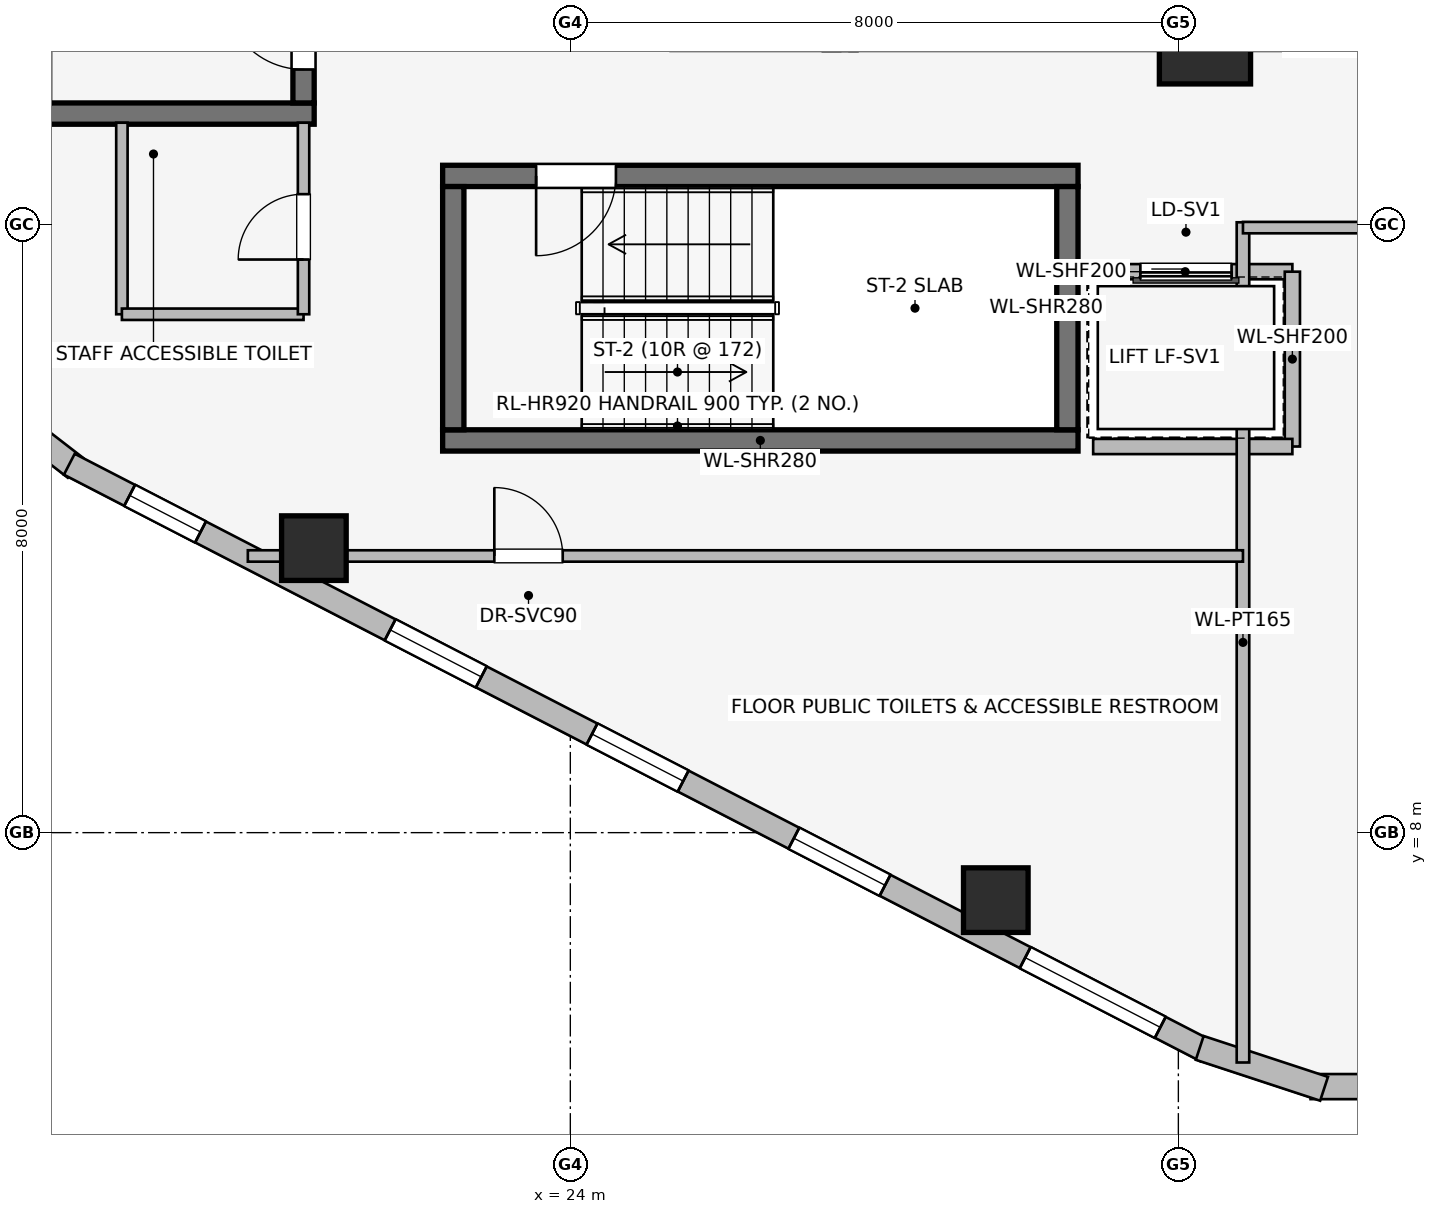
"""IFC4 building model, lengths in metres.
Left out: names, types, materials, properties, quantities, classifications, styles, units other than length and angle.
Written with IfcOpenShell. Run it as: python <this file> out.ifc"""

import sys

from ifc_helpers import new_model, si_unit, direction, frame, frame_2d, origin, origin_2d, place, context, subcontext, project, spatial, rectangle, extrude, element, fill, save


model = new_model("IFC4")
c1 = context("Model", 3, precision=1e-05, world=origin(), true_north=direction((0.0, 1.0)))
c2 = subcontext(c1, "Body", "Model", "MODEL_VIEW")
j1 = project(units=[si_unit("LENGTHUNIT", "METRE"), si_unit("PLANEANGLEUNIT", "RADIAN")], contexts=[c1])
p1 = place(None, origin())
s1 = spatial("IfcSite", under=j1, at=p1, CompositionType="ELEMENT")
p2 = place(p1, origin())
s2 = spatial("IfcBuilding", under=s1, at=p2, CompositionType="ELEMENT")
p3 = place(p2, frame((0.0, 0.0, 217.15)))
s3 = spatial("IfcBuildingStorey", under=s2, at=p3, CompositionType="ELEMENT", Elevation=217.15)
p4 = place(p3, frame((16.87, 17.46, 0.0), z_axis=(0.0, 0.0, 1.0), x_axis=(1.0, 0.0, 0.0)))
e1 = element("IfcWall", 1, at=p4, inside=s3, PredefinedType="SHEAR", context=c2, shape_type="SweptSolid", body=[
    extrude(rectangle(XDim=3.76, YDim=0.28, at=frame_2d((1.88, 0.0))), origin(), (0.0, 0.0, 1.0), 3.45),
])
p5 = place(p3, frame((20.49, 17.6, 0.0), z_axis=(0.0, 0.0, 1.0), x_axis=(0.0, 1.0, 0.0)))
e2 = element("IfcWall", 2, at=p5, inside=s3, PredefinedType="SHEAR", context=c2, shape_type="SweptSolid", body=[
    extrude(rectangle(XDim=7.8, YDim=0.28, at=frame_2d((3.9, 0.0))), origin(), (0.0, 0.0, 1.0), 3.45),
])
p6 = place(p5, frame((0.44, 0.0, 0.0)))
e3 = element("IfcOpeningElement", 3, at=p6, cuts=e2, PredefinedType="OPENING", context=c2, shape_type="SweptSolid", body=[
    extrude(rectangle(XDim=1.05, YDim=2.0, at=frame_2d((0.525, 1.0))), frame((0.0, 0.15, 0.0), z_axis=(0.0, -1.0, 0.0), x_axis=(1.0, 0.0, 0.0)), (0.0, 0.0, 1.0), 0.3),
])
p7 = place(p3, frame((22.32, 13.16, 0.0), z_axis=(0.0, 0.0, 1.0), x_axis=(1.0, 0.0, 0.0)))
e4 = element("IfcWall", 4, at=p7, inside=s3, PredefinedType="SHEAR", context=c2, shape_type="SweptSolid", body=[
    extrude(rectangle(XDim=8.36, YDim=0.28, at=frame_2d((4.18, 0.0))), origin(), (0.0, 0.0, 1.0), 3.45),
])
p8 = place(p3, frame((30.68, 16.64, 0.0), z_axis=(0.0, 0.0, 1.0), x_axis=(-1.0, 0.0, 0.0)))
e5 = element("IfcWall", 5, at=p8, inside=s3, PredefinedType="SHEAR", context=c2, shape_type="SweptSolid", body=[
    extrude(rectangle(XDim=8.36, YDim=0.28, at=frame_2d((4.18, 0.0))), origin(), (0.0, 0.0, 1.0), 3.45),
])
p9 = place(p8, frame((6.08, 0.0, 0.0)))
e6 = element("IfcOpeningElement", 6, at=p9, cuts=e5, PredefinedType="OPENING", context=c2, shape_type="SweptSolid", body=[
    extrude(rectangle(XDim=1.05, YDim=2.0, at=frame_2d((0.525, 1.0))), frame((0.0, 0.15, 0.0), z_axis=(0.0, -1.0, 0.0), x_axis=(1.0, 0.0, 0.0)), (0.0, 0.0, 1.0), 0.3),
])
for number, where, z_axis, x_axis in (
    (7, (22.46, 16.5, 0.0), (0.0, 0.0, 1.0), (0.0, -1.0, 0.0)),
    (8, (30.54, 13.3, 0.0), (0.0, 0.0, 1.0), (0.0, 1.0, 0.0)),
):
    element("IfcWall", number, at=place(p3, frame(where, z_axis=z_axis, x_axis=x_axis)), inside=s3, PredefinedType="SHEAR", context=c2, shape_type="SweptSolid", body=[
        extrude(rectangle(XDim=3.2, YDim=0.28, at=frame_2d((1.6, 0.0))), origin(), (0.0, 0.0, 1.0), 3.45),
    ])
p10 = place(p3, frame((32.35, 18.45, 0.0), z_axis=(0.0, 0.0, 1.0), x_axis=(1.0, 0.0, 0.0)))
e9 = element("IfcColumn", 9, at=p10, inside=s3, PredefinedType="COLUMN", context=c2, shape_type="SweptSolid", body=[
    extrude(rectangle(XDim=1.2, YDim=1.2, at=origin_2d()), origin(), (0.0, 0.0, 1.0), 3.45),
])
for number, where, z_axis, x_axis in (
    (10, (20.626, 11.743, 0.0), (0.0, 0.0, 1.0), (1.0, 0.0, 0.0)),
    (11, (29.598, 7.112, 0.0), (0.0, 0.0, 1.0), (1.0, 0.0, 0.0)),
):
    element("IfcColumn", number, at=place(p3, frame(where, z_axis=z_axis, x_axis=x_axis)), inside=s3, PredefinedType="COLUMN", context=c2, shape_type="SweptSolid", body=[
        extrude(rectangle(XDim=0.85, YDim=0.85, at=origin_2d()), origin(), (0.0, 0.0, 1.0), 3.45),
    ])
p11 = place(p3, frame((17.489, 12.8, 0.0), z_axis=(0.0, 0.0, 1.0), x_axis=(-0.791409877269, 0.611285862884, 0.0)))
e12 = element("IfcWall", 12, at=p11, inside=s3, PredefinedType="STANDARD", context=c2, shape_type="SweptSolid", body=[
    extrude(rectangle(XDim=1.677, YDim=0.33, at=frame_2d((0.838, 0.0))), origin(), (0.0, 0.0, 1.0), 3.03),
])
p12 = place(p3, frame((32.362, 5.129, 0.0), z_axis=(0.0, 0.0, 1.0), x_axis=(-0.888626188278, 0.458632202867, 0.0)))
e13 = element("IfcWall", 13, at=p12, inside=s3, PredefinedType="STANDARD", context=c2, shape_type="SweptSolid", body=[
    extrude(rectangle(XDim=16.828, YDim=0.31, at=frame_2d((8.414, 0.0))), origin(), (0.0, 0.0, 1.0), 3.03),
])
p13 = place(p12, frame((0.675, 0.0, 0.75)))
e14 = element("IfcOpeningElement", 14, at=p13, cuts=e13, PredefinedType="OPENING", context=c2, shape_type="SweptSolid", body=[
    extrude(rectangle(XDim=2.0, YDim=1.5, at=frame_2d((1.0, 0.75))), frame((0.0, 0.165, 0.0), z_axis=(0.0, -1.0, 0.0), x_axis=(1.0, 0.0, 0.0)), (0.0, 0.0, 1.0), 0.33),
])
p14 = place(p12, frame((4.75, 0.0, 0.75)))
e15 = element("IfcOpeningElement", 15, at=p14, cuts=e13, PredefinedType="OPENING", context=c2, shape_type="SweptSolid", body=[
    extrude(rectangle(XDim=1.35, YDim=1.45, at=frame_2d((0.675, 0.725))), frame((0.0, 0.165, 0.0), z_axis=(0.0, -1.0, 0.0), x_axis=(1.0, 0.0, 0.0)), (0.0, 0.0, 1.0), 0.33),
])
p15 = place(p12, frame((7.739, 0.0, 0.75)))
e16 = element("IfcOpeningElement", 16, at=p15, cuts=e13, PredefinedType="OPENING", context=c2, shape_type="SweptSolid", body=[
    extrude(rectangle(XDim=1.35, YDim=1.45, at=frame_2d((0.675, 0.725))), frame((0.0, 0.165, 0.0), z_axis=(0.0, -1.0, 0.0), x_axis=(1.0, 0.0, 0.0)), (0.0, 0.0, 1.0), 0.33),
])
p16 = place(p12, frame((10.728, 0.0, 0.75)))
e17 = element("IfcOpeningElement", 17, at=p16, cuts=e13, PredefinedType="OPENING", context=c2, shape_type="SweptSolid", body=[
    extrude(rectangle(XDim=1.35, YDim=1.45, at=frame_2d((0.675, 0.725))), frame((0.0, 0.165, 0.0), z_axis=(0.0, -1.0, 0.0), x_axis=(1.0, 0.0, 0.0)), (0.0, 0.0, 1.0), 0.33),
])
p17 = place(p12, frame((14.885, 0.0, 0.75)))
e18 = element("IfcOpeningElement", 18, at=p17, cuts=e13, PredefinedType="OPENING", context=c2, shape_type="SweptSolid", body=[
    extrude(rectangle(XDim=1.05, YDim=1.4, at=frame_2d((0.525, 0.7))), frame((0.0, 0.165, 0.0), z_axis=(0.0, -1.0, 0.0), x_axis=(1.0, 0.0, 0.0)), (0.0, 0.0, 1.0), 0.33),
])
p18 = place(p3, frame((35.461, 4.659, 0.0), z_axis=(0.0, 0.0, 1.0), x_axis=(-1.0, 0.0, 0.0)))
e19 = element("IfcWall", 19, at=p18, inside=s3, PredefinedType="STANDARD", context=c2, shape_type="SweptSolid", body=[
    extrude(rectangle(XDim=1.722, YDim=0.33, at=frame_2d((0.861, 0.0))), origin(), (0.0, 0.0, 1.0), 3.03),
])
p19 = place(p3, frame((33.917, 4.63, 0.0), z_axis=(0.0, 0.0, 1.0), x_axis=(-0.949937416267, 0.312440242569, 0.0)))
e20 = element("IfcWall", 20, at=p19, inside=s3, PredefinedType="STANDARD", context=c2, shape_type="SweptSolid", body=[
    extrude(rectangle(XDim=1.722, YDim=0.33, at=frame_2d((0.861, 0.0))), origin(), (0.0, 0.0, 1.0), 3.03),
])
p20 = place(p3, frame((33.5, 15.38, 0.0), z_axis=(0.0, 0.0, 1.0), x_axis=(-1.0, 0.0, 0.0)))
e21 = element("IfcWall", 21, at=p20, inside=s3, PredefinedType="PARTITIONING", context=c2, shape_type="SweptSolid", body=[
    extrude(rectangle(XDim=2.82, YDim=0.2, at=frame_2d((1.41, 0.0))), origin(), (0.0, 0.0, 1.0), 3.03),
])
p21 = place(p20, frame((0.8, 0.0, 0.0)))
e22 = element("IfcOpeningElement", 22, at=p21, cuts=e21, PredefinedType="OPENING", context=c2, shape_type="SweptSolid", body=[
    extrude(rectangle(XDim=1.2, YDim=2.2, at=frame_2d((0.6, 1.1))), frame((0.0, 0.11, 0.0), z_axis=(0.0, -1.0, 0.0), x_axis=(1.0, 0.0, 0.0)), (0.0, 0.0, 1.0), 0.22),
])
p22 = place(p3, frame((33.5, 13.08, 0.0), z_axis=(0.0, 0.0, 1.0), x_axis=(0.0, 1.0, 0.0)))
e23 = element("IfcWall", 23, at=p22, inside=s3, PredefinedType="PARTITIONING", context=c2, shape_type="SweptSolid", body=[
    extrude(rectangle(XDim=2.3, YDim=0.2, at=frame_2d((1.15, 0.0))), origin(), (0.0, 0.0, 1.0), 3.03),
])
p23 = place(p3, frame((30.879, 13.08, 0.0), z_axis=(0.0, 0.0, 1.0), x_axis=(1.0, 0.0, 0.0)))
e24 = element("IfcWall", 24, at=p23, inside=s3, PredefinedType="PARTITIONING", context=c2, shape_type="SweptSolid", body=[
    extrude(rectangle(XDim=2.621, YDim=0.2, at=frame_2d((1.311, 0.0))), origin(), (0.0, 0.0, 1.0), 3.03),
])
p24 = place(p3, frame((18.1, 17.34, 0.0), z_axis=(0.0, 0.0, 1.0), x_axis=(0.0, -1.0, 0.0)))
e25 = element("IfcWall", 25, at=p24, inside=s3, PredefinedType="PARTITIONING", context=c2, shape_type="SweptSolid", body=[
    extrude(rectangle(XDim=2.52, YDim=0.15, at=frame_2d((1.26, 0.0))), origin(), (0.0, 0.0, 1.0), 3.03),
])
p25 = place(p3, frame((18.1, 14.82, 0.0), z_axis=(0.0, 0.0, 1.0), x_axis=(1.0, 0.0, 0.0)))
e26 = element("IfcWall", 26, at=p25, inside=s3, PredefinedType="PARTITIONING", context=c2, shape_type="SweptSolid", body=[
    extrude(rectangle(XDim=2.39, YDim=0.15, at=frame_2d((1.195, 0.0))), origin(), (0.0, 0.0, 1.0), 3.03),
])
p26 = place(p3, frame((20.49, 14.82, 0.0), z_axis=(0.0, 0.0, 1.0), x_axis=(0.0, 1.0, 0.0)))
e27 = element("IfcWall", 27, at=p26, inside=s3, PredefinedType="PARTITIONING", context=c2, shape_type="SweptSolid", body=[
    extrude(rectangle(XDim=2.52, YDim=0.15, at=frame_2d((1.26, 0.0))), origin(), (0.0, 0.0, 1.0), 3.03),
])
p27 = place(p26, frame((0.72, 0.0, 0.0)))
e28 = element("IfcOpeningElement", 28, at=p27, cuts=e27, PredefinedType="OPENING", context=c2, shape_type="SweptSolid", body=[
    extrude(rectangle(XDim=0.86, YDim=2.0, at=frame_2d((0.43, 1.0))), frame((0.0, 0.085, 0.0), z_axis=(0.0, -1.0, 0.0), x_axis=(1.0, 0.0, 0.0)), (0.0, 0.0, 1.0), 0.17),
])
p28 = place(p3, frame((32.85, 4.976, 0.0), z_axis=(0.0, 0.0, 1.0), x_axis=(0.0, 1.0, 0.0)))
e29 = element("IfcWall", 29, at=p28, inside=s3, PredefinedType="PARTITIONING", context=c2, shape_type="SweptSolid", body=[
    extrude(rectangle(XDim=11.054, YDim=0.165, at=frame_2d((5.527, 0.0))), origin(), (0.0, 0.0, 1.0), 3.03),
])
p29 = place(p3, frame((19.757, 11.64, 0.0), z_axis=(0.0, 0.0, 1.0), x_axis=(1.0, 0.0, 0.0)))
e30 = element("IfcWall", 30, at=p29, inside=s3, PredefinedType="PARTITIONING", context=c2, shape_type="SweptSolid", body=[
    extrude(rectangle(XDim=13.093, YDim=0.15, at=frame_2d((6.546, 0.0))), origin(), (0.0, 0.0, 1.0), 3.03),
])
p30 = place(p29, frame((3.243, 0.0, 0.0)))
e31 = element("IfcOpeningElement", 31, at=p30, cuts=e30, PredefinedType="OPENING", context=c2, shape_type="SweptSolid", body=[
    extrude(rectangle(XDim=0.9, YDim=2.0, at=frame_2d((0.45, 1.0))), frame((0.0, 0.085, 0.0), z_axis=(0.0, -1.0, 0.0), x_axis=(1.0, 0.0, 0.0)), (0.0, 0.0, 1.0), 0.17),
])
p31 = place(p3, frame((32.85, 15.96, 0.0), z_axis=(0.0, 0.0, 1.0), x_axis=(1.0, 0.0, 0.0)))
e32 = element("IfcWall", 32, at=p31, inside=s3, PredefinedType="PARTITIONING", context=c2, shape_type="SweptSolid", body=[
    extrude(rectangle(XDim=7.03, YDim=0.15, at=frame_2d((3.515, 0.0))), origin(), (0.0, 0.0, 1.0), 3.03),
])
p32 = place(p31, frame((2.785, 0.0, 0.0)))
e33 = element("IfcOpeningElement", 33, at=p32, cuts=e32, PredefinedType="OPENING", context=c2, shape_type="SweptSolid", body=[
    extrude(rectangle(XDim=0.96, YDim=2.0, at=frame_2d((0.48, 1.0))), frame((0.0, 0.085, 0.0), z_axis=(0.0, -1.0, 0.0), x_axis=(1.0, 0.0, 0.0)), (0.0, 0.0, 1.0), 0.17),
])
p33 = place(p13, origin())
e34 = element("IfcWindow", 34, at=p33, inside=s3, PartitioningType="SINGLE_PANEL", PredefinedType="WINDOW", context=c2, shape_type="SweptSolid", body=[
    extrude(rectangle(XDim=2.0, YDim=1.5, at=frame_2d((1.0, 0.75))), frame((0.0, 0.03, 0.0), z_axis=(0.0, -1.0, 0.0), x_axis=(1.0, 0.0, 0.0)), (0.0, 0.0, 1.0), 0.06),
])
fill(e14, e34)
p34 = place(p14, origin())
e35 = element("IfcWindow", 35, at=p34, inside=s3, PartitioningType="SINGLE_PANEL", PredefinedType="WINDOW", context=c2, shape_type="SweptSolid", body=[
    extrude(rectangle(XDim=1.35, YDim=1.45, at=frame_2d((0.675, 0.725))), frame((0.0, 0.03, 0.0), z_axis=(0.0, -1.0, 0.0), x_axis=(1.0, 0.0, 0.0)), (0.0, 0.0, 1.0), 0.06),
])
fill(e15, e35)
p35 = place(p15, origin())
e36 = element("IfcWindow", 36, at=p35, inside=s3, PartitioningType="SINGLE_PANEL", PredefinedType="WINDOW", context=c2, shape_type="SweptSolid", body=[
    extrude(rectangle(XDim=1.35, YDim=1.45, at=frame_2d((0.675, 0.725))), frame((0.0, 0.03, 0.0), z_axis=(0.0, -1.0, 0.0), x_axis=(1.0, 0.0, 0.0)), (0.0, 0.0, 1.0), 0.06),
])
fill(e16, e36)
p36 = place(p16, origin())
e37 = element("IfcWindow", 37, at=p36, inside=s3, PartitioningType="SINGLE_PANEL", PredefinedType="WINDOW", context=c2, shape_type="SweptSolid", body=[
    extrude(rectangle(XDim=1.35, YDim=1.45, at=frame_2d((0.675, 0.725))), frame((0.0, 0.03, 0.0), z_axis=(0.0, -1.0, 0.0), x_axis=(1.0, 0.0, 0.0)), (0.0, 0.0, 1.0), 0.06),
])
fill(e17, e37)
p37 = place(p17, origin())
e38 = element("IfcWindow", 38, at=p37, inside=s3, PartitioningType="SINGLE_PANEL", PredefinedType="WINDOW", context=c2, shape_type="SweptSolid", body=[
    extrude(rectangle(XDim=1.05, YDim=1.4, at=frame_2d((0.525, 0.7))), frame((0.0, 0.03, 0.0), z_axis=(0.0, -1.0, 0.0), x_axis=(1.0, 0.0, 0.0)), (0.0, 0.0, 1.0), 0.06),
])
fill(e18, e38)
p38 = place(p6, origin())
e39 = element("IfcDoor", 39, at=p38, inside=s3, OperationType="SINGLE_SWING_RIGHT", PredefinedType="DOOR", context=c2, shape_type="SweptSolid", body=[
    extrude(rectangle(XDim=1.05, YDim=2.0, at=frame_2d((0.525, 1.0))), frame((0.0, 0.025, 0.0), z_axis=(0.0, -1.0, 0.0), x_axis=(1.0, 0.0, 0.0)), (0.0, 0.0, 1.0), 0.05),
])
fill(e3, e39)
p39 = place(p9, origin())
e40 = element("IfcDoor", 40, at=p39, inside=s3, OperationType="SINGLE_SWING_RIGHT", PredefinedType="DOOR", context=c2, shape_type="SweptSolid", body=[
    extrude(rectangle(XDim=1.05, YDim=2.0, at=frame_2d((0.525, 1.0))), frame((0.0, 0.025, 0.0), z_axis=(0.0, -1.0, 0.0), x_axis=(1.0, 0.0, 0.0)), (0.0, 0.0, 1.0), 0.05),
])
fill(e6, e40)
p40 = place(p21, origin())
e41 = element("IfcDoor", 41, at=p40, inside=s3, OperationType="SLIDING_TO_RIGHT", PredefinedType="DOOR", context=c2, shape_type="SweptSolid", body=[
    extrude(rectangle(XDim=1.2, YDim=2.2, at=frame_2d((0.6, 1.1))), frame((0.0, 0.025, 0.0), z_axis=(0.0, -1.0, 0.0), x_axis=(1.0, 0.0, 0.0)), (0.0, 0.0, 1.0), 0.05),
])
fill(e22, e41)
p41 = place(p27, origin())
e42 = element("IfcDoor", 42, at=p41, inside=s3, OperationType="SINGLE_SWING_LEFT", PredefinedType="DOOR", context=c2, shape_type="SweptSolid", body=[
    extrude(rectangle(XDim=0.86, YDim=2.0, at=frame_2d((0.43, 1.0))), frame((0.0, 0.025, 0.0), z_axis=(0.0, -1.0, 0.0), x_axis=(1.0, 0.0, 0.0)), (0.0, 0.0, 1.0), 0.05),
])
fill(e28, e42)
p42 = place(p30, origin())
e43 = element("IfcDoor", 43, at=p42, inside=s3, OperationType="SINGLE_SWING_LEFT", PredefinedType="DOOR", context=c2, shape_type="SweptSolid", body=[
    extrude(rectangle(XDim=0.9, YDim=2.0, at=frame_2d((0.45, 1.0))), frame((0.0, 0.025, 0.0), z_axis=(0.0, -1.0, 0.0), x_axis=(1.0, 0.0, 0.0)), (0.0, 0.0, 1.0), 0.05),
])
fill(e31, e43)
save(model, sys.argv[1])
